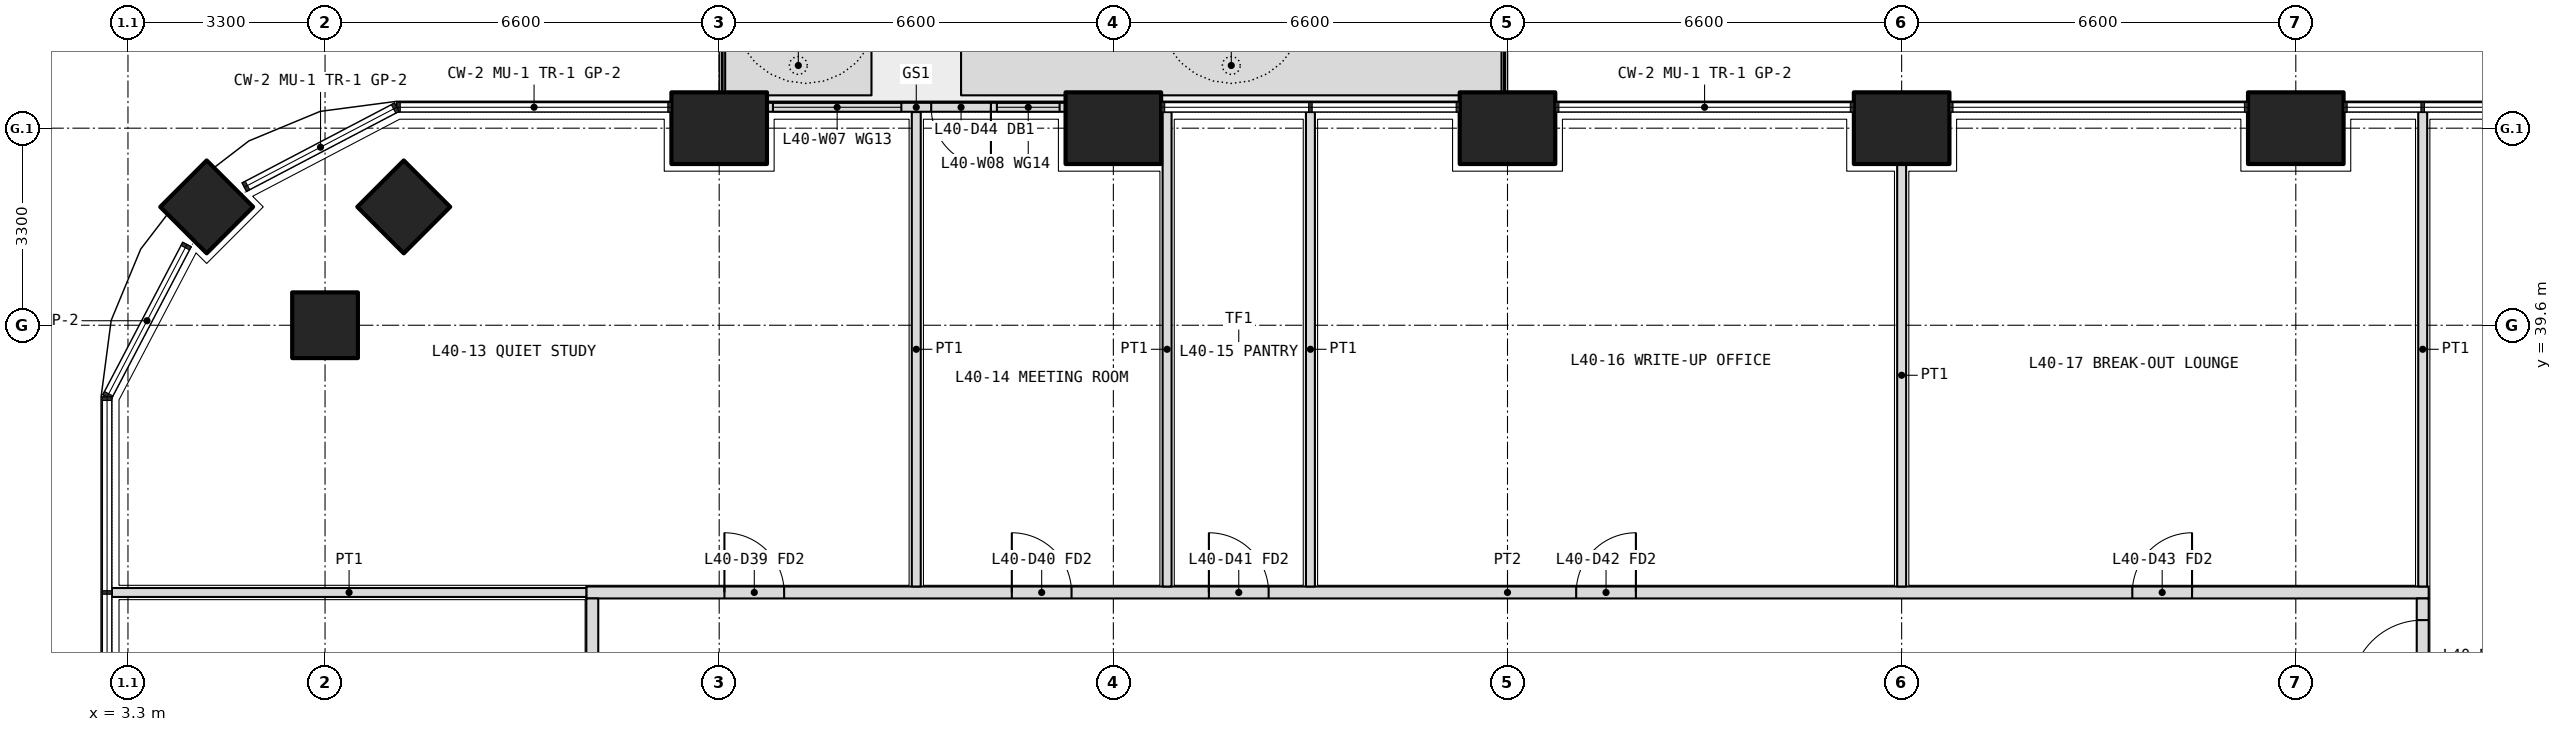
"""IFC4 building model, lengths in metres.
Left out: names, types, materials, properties, quantities, classifications, styles, units other than length and angle.
Written with IfcOpenShell. Run it as: python <this file> out.ifc"""

import sys

from ifc_helpers import new_model, si_unit, direction, frame, frame_2d, origin, origin_2d, place, context, subcontext, project, spatial, polyline, rectangle, outline, extrude, element, fill, save


model = new_model("IFC4")
c1 = context("Model", 3, precision=1e-05, world=origin(), true_north=direction((0.0, 1.0)))
c2 = subcontext(c1, "Body", "Model", "MODEL_VIEW")
j1 = project(units=[si_unit("LENGTHUNIT", "METRE"), si_unit("PLANEANGLEUNIT", "RADIAN")], contexts=[c1])
p1 = place(None, origin())
s1 = spatial("IfcSite", under=j1, at=p1, CompositionType="ELEMENT")
p2 = place(p1, origin())
s2 = spatial("IfcBuilding", under=s1, at=p2, CompositionType="ELEMENT")
p3 = place(p2, frame((0.0, 0.0, 176.7)))
s3 = spatial("IfcBuildingStorey", under=s2, at=p3, CompositionType="ELEMENT", Elevation=176.7)
p4 = place(p3, frame((4.618, 41.582, 0.0), z_axis=(0.0, 0.0, 1.0), x_axis=(0.707106781187, 0.707106781187, 0.0)))
e1 = element("IfcColumn", 1, at=p4, inside=s3, PredefinedType="COLUMN", context=c2, shape_type="SweptSolid", body=[
    extrude(rectangle(XDim=1.1, YDim=1.1, at=origin_2d()), origin(), (0.0, 0.0, 1.0), 4.2),
])
for number, where, z_axis, x_axis in (
    (2, (13.2, 42.9, 0.0), (0.0, 0.0, 1.0), (1.0, 0.0, 0.0)),
    (3, (19.8, 42.9, 0.0), (0.0, 0.0, 1.0), (1.0, 0.0, 0.0)),
    (4, (26.4, 42.9, 0.0), (0.0, 0.0, 1.0), (1.0, 0.0, 0.0)),
    (5, (33.0, 42.9, 0.0), (0.0, 0.0, 1.0), (1.0, 0.0, 0.0)),
    (6, (39.6, 42.9, 0.0), (0.0, 0.0, 1.0), (1.0, 0.0, 0.0)),
):
    element("IfcColumn", number, at=place(p3, frame(where, z_axis=z_axis, x_axis=x_axis)), inside=s3, PredefinedType="COLUMN", context=c2, shape_type="SweptSolid", body=[
        extrude(rectangle(XDim=1.6, YDim=1.2, at=origin_2d()), origin(), (0.0, 0.0, 1.0), 4.2),
    ])
for number, where, z_axis, x_axis in (
    (7, (6.6, 39.6, 0.0), (0.0, 0.0, 1.0), (1.0, 0.0, 0.0)),
    (8, (7.918, 41.582, 0.0), (0.0, 0.0, 1.0), (0.707, 0.707, 0.0)),
):
    element("IfcColumn", number, at=place(p3, frame(where, z_axis=z_axis, x_axis=x_axis)), inside=s3, PredefinedType="COLUMN", context=c2, shape_type="SweptSolid", body=[
        extrude(rectangle(XDim=1.1, YDim=1.1, at=origin_2d()), origin(), (0.0, 0.0, 1.0), 4.2),
    ])
p5 = place(p3, origin())
e9 = element("IfcWall", 9, at=p5, inside=s3, PredefinedType="USERDEFINED", context=c2, shape_type="SweptSolid", body=[
    extrude(outline(polyline([(13.3, 43.45), (15.75, 43.45), (15.75, 44.45), (13.3, 44.45), (13.3, 43.45)]), holes=[polyline([(13.45, 43.6), (15.6, 43.6), (15.6, 44.3), (13.45, 44.3), (13.45, 43.6)])]), origin(), (0.0, 0.0, 1.0), 1.05),
])
p6 = place(p3, origin())
e10 = element("IfcWall", 10, at=p6, inside=s3, PredefinedType="USERDEFINED", context=c2, shape_type="SweptSolid", body=[
    extrude(outline(polyline([(17.25, 43.45), (26.3, 43.45), (26.3, 44.45), (17.25, 44.45), (17.25, 43.45)]), holes=[polyline([(17.4, 43.6), (26.15, 43.6), (26.15, 44.3), (17.4, 44.3), (17.4, 43.6)])]), origin(), (0.0, 0.0, 1.0), 1.05),
])
p7 = place(p3, frame((19.0, 43.25, 0.0), z_axis=(0.0, 0.0, 1.0), x_axis=(-1.0, 0.0, 0.0)))
e11 = element("IfcWall", 11, at=p7, inside=s3, PredefinedType="SOLIDWALL", context=c2, shape_type="SweptSolid", body=[
    extrude(rectangle(XDim=5.0, YDim=0.15, at=frame_2d((2.5, 0.0))), origin(), (0.0, 0.0, 1.0), 2.7),
])
p8 = place(p7, frame((1.25, 0.0, 0.0)))
e12 = element("IfcOpeningElement", 12, at=p8, cuts=e11, PredefinedType="OPENING", context=c2, shape_type="SweptSolid", body=[
    extrude(rectangle(XDim=1.0, YDim=2.4, at=frame_2d((0.5, 1.2))), frame((0.0, 0.085, 0.0), z_axis=(0.0, -1.0, 0.0), x_axis=(1.0, 0.0, 0.0)), (0.0, 0.0, 1.0), 0.17),
])
p9 = place(p7, frame((0.1, 0.0, 0.1)))
e13 = element("IfcOpeningElement", 13, at=p9, cuts=e11, PredefinedType="OPENING", context=c2, shape_type="SweptSolid", body=[
    extrude(rectangle(XDim=1.05, YDim=2.3, at=frame_2d((0.525, 1.15))), frame((0.0, 0.085, 0.0), z_axis=(0.0, -1.0, 0.0), x_axis=(1.0, 0.0, 0.0)), (0.0, 0.0, 1.0), 0.17),
])
p10 = place(p7, frame((2.75, 0.0, 0.1)))
e14 = element("IfcOpeningElement", 14, at=p10, cuts=e11, PredefinedType="OPENING", context=c2, shape_type="SweptSolid", body=[
    extrude(rectangle(XDim=2.15, YDim=2.3, at=frame_2d((1.075, 1.15))), frame((0.0, 0.085, 0.0), z_axis=(0.0, -1.0, 0.0), x_axis=(1.0, 0.0, 0.0)), (0.0, 0.0, 1.0), 0.17),
])
p11 = place(p3, frame((10.975, 35.125, 0.0), z_axis=(0.0, 0.0, 1.0), x_axis=(1.0, 0.0, 0.0)))
e15 = element("IfcWall", 15, at=p11, inside=s3, PredefinedType="PARTITIONING", context=c2, shape_type="SweptSolid", body=[
    extrude(rectangle(XDim=30.85, YDim=0.2, at=frame_2d((15.425, 0.0))), origin(), (0.0, 0.0, 1.0), 2.85),
])
p12 = place(p11, frame((2.312, 0.0, 0.0)))
e16 = element("IfcOpeningElement", 16, at=p12, cuts=e15, PredefinedType="OPENING", context=c2, shape_type="SweptSolid", body=[
    extrude(rectangle(XDim=1.0, YDim=2.1, at=frame_2d((0.5, 1.05))), frame((0.0, 0.11, 0.0), z_axis=(0.0, -1.0, 0.0), x_axis=(1.0, 0.0, 0.0)), (0.0, 0.0, 1.0), 0.22),
])
p13 = place(p11, frame((7.125, 0.0, 0.0)))
e17 = element("IfcOpeningElement", 17, at=p13, cuts=e15, PredefinedType="OPENING", context=c2, shape_type="SweptSolid", body=[
    extrude(rectangle(XDim=1.0, YDim=2.1, at=frame_2d((0.5, 1.05))), frame((0.0, 0.11, 0.0), z_axis=(0.0, -1.0, 0.0), x_axis=(1.0, 0.0, 0.0)), (0.0, 0.0, 1.0), 0.22),
])
p14 = place(p11, frame((10.425, 0.0, 0.0)))
e18 = element("IfcOpeningElement", 18, at=p14, cuts=e15, PredefinedType="OPENING", context=c2, shape_type="SweptSolid", body=[
    extrude(rectangle(XDim=1.0, YDim=2.1, at=frame_2d((0.5, 1.05))), frame((0.0, 0.11, 0.0), z_axis=(0.0, -1.0, 0.0), x_axis=(1.0, 0.0, 0.0)), (0.0, 0.0, 1.0), 0.22),
])
p15 = place(p11, frame((16.575, 0.0, 0.0)))
e19 = element("IfcOpeningElement", 19, at=p15, cuts=e15, PredefinedType="OPENING", context=c2, shape_type="SweptSolid", body=[
    extrude(rectangle(XDim=1.0, YDim=2.1, at=frame_2d((0.5, 1.05))), frame((0.0, 0.11, 0.0), z_axis=(0.0, -1.0, 0.0), x_axis=(1.0, 0.0, 0.0)), (0.0, 0.0, 1.0), 0.22),
])
p16 = place(p11, frame((25.887, 0.0, 0.0)))
e20 = element("IfcOpeningElement", 20, at=p16, cuts=e15, PredefinedType="OPENING", context=c2, shape_type="SweptSolid", body=[
    extrude(rectangle(XDim=1.0, YDim=2.1, at=frame_2d((0.5, 1.05))), frame((0.0, 0.11, 0.0), z_axis=(0.0, -1.0, 0.0), x_axis=(1.0, 0.0, 0.0)), (0.0, 0.0, 1.0), 0.22),
])
p17 = place(p3, frame((11.075, 11.175, 0.0), z_axis=(0.0, 0.0, 1.0), x_axis=(0.0, 1.0, 0.0)))
e21 = element("IfcWall", 21, at=p17, inside=s3, PredefinedType="PARTITIONING", context=c2, shape_type="SweptSolid", body=[
    extrude(rectangle(XDim=23.85, YDim=0.2, at=frame_2d((11.925, 0.0))), origin(), (0.0, 0.0, 1.0), 2.85),
])
p18 = place(p17, frame((0.462, 0.0, 0.0)))
e22 = element("IfcOpeningElement", 22, at=p18, cuts=e21, PredefinedType="OPENING", context=c2, shape_type="SweptSolid", body=[
    extrude(rectangle(XDim=1.0, YDim=2.1, at=frame_2d((0.5, 1.05))), frame((0.0, 0.11, 0.0), z_axis=(0.0, -1.0, 0.0), x_axis=(1.0, 0.0, 0.0)), (0.0, 0.0, 1.0), 0.22),
])
p19 = place(p17, frame((3.125, 0.0, 0.0)))
e23 = element("IfcOpeningElement", 23, at=p19, cuts=e21, PredefinedType="OPENING", context=c2, shape_type="SweptSolid", body=[
    extrude(rectangle(XDim=1.0, YDim=2.1, at=frame_2d((0.5, 1.05))), frame((0.0, 0.11, 0.0), z_axis=(0.0, -1.0, 0.0), x_axis=(1.0, 0.0, 0.0)), (0.0, 0.0, 1.0), 0.22),
])
p20 = place(p17, frame((6.475, 0.0, 0.0)))
e24 = element("IfcOpeningElement", 24, at=p20, cuts=e21, PredefinedType="OPENING", context=c2, shape_type="SweptSolid", body=[
    extrude(rectangle(XDim=0.9, YDim=2.1, at=frame_2d((0.45, 1.05))), frame((0.0, 0.11, 0.0), z_axis=(0.0, -1.0, 0.0), x_axis=(1.0, 0.0, 0.0)), (0.0, 0.0, 1.0), 0.22),
])
p21 = place(p17, frame((9.675, 0.0, 0.0)))
e25 = element("IfcOpeningElement", 25, at=p21, cuts=e21, PredefinedType="OPENING", context=c2, shape_type="SweptSolid", body=[
    extrude(rectangle(XDim=0.9, YDim=2.1, at=frame_2d((0.45, 1.05))), frame((0.0, 0.11, 0.0), z_axis=(0.0, -1.0, 0.0), x_axis=(1.0, 0.0, 0.0)), (0.0, 0.0, 1.0), 0.22),
])
p22 = place(p17, frame((12.925, 0.0, 0.0)))
e26 = element("IfcOpeningElement", 26, at=p22, cuts=e21, PredefinedType="OPENING", context=c2, shape_type="SweptSolid", body=[
    extrude(rectangle(XDim=1.0, YDim=2.1, at=frame_2d((0.5, 1.05))), frame((0.0, 0.11, 0.0), z_axis=(0.0, -1.0, 0.0), x_axis=(1.0, 0.0, 0.0)), (0.0, 0.0, 1.0), 0.22),
])
p23 = place(p17, frame((19.087, 0.0, 0.0)))
e27 = element("IfcOpeningElement", 27, at=p23, cuts=e21, PredefinedType="OPENING", context=c2, shape_type="SweptSolid", body=[
    extrude(rectangle(XDim=1.0, YDim=2.1, at=frame_2d((0.5, 1.05))), frame((0.0, 0.11, 0.0), z_axis=(0.0, -1.0, 0.0), x_axis=(1.0, 0.0, 0.0)), (0.0, 0.0, 1.0), 0.22),
])
p24 = place(p3, frame((41.725, 11.175, 0.0), z_axis=(0.0, 0.0, 1.0), x_axis=(0.0, 1.0, 0.0)))
e28 = element("IfcWall", 28, at=p24, inside=s3, PredefinedType="PARTITIONING", context=c2, shape_type="SweptSolid", body=[
    extrude(rectangle(XDim=23.85, YDim=0.2, at=frame_2d((11.925, 0.0))), origin(), (0.0, 0.0, 1.0), 2.85),
])
p25 = place(p24, frame((2.113, 0.0, 0.0)))
e29 = element("IfcOpeningElement", 29, at=p25, cuts=e28, PredefinedType="OPENING", context=c2, shape_type="SweptSolid", body=[
    extrude(rectangle(XDim=1.0, YDim=2.1, at=frame_2d((0.5, 1.05))), frame((0.0, 0.11, 0.0), z_axis=(0.0, -1.0, 0.0), x_axis=(1.0, 0.0, 0.0)), (0.0, 0.0, 1.0), 0.22),
])
p26 = place(p24, frame((6.475, 0.0, 0.0)))
e30 = element("IfcOpeningElement", 30, at=p26, cuts=e28, PredefinedType="OPENING", context=c2, shape_type="SweptSolid", body=[
    extrude(rectangle(XDim=1.0, YDim=2.1, at=frame_2d((0.5, 1.05))), frame((0.0, 0.11, 0.0), z_axis=(0.0, -1.0, 0.0), x_axis=(1.0, 0.0, 0.0)), (0.0, 0.0, 1.0), 0.22),
])
p27 = place(p24, frame((9.625, 0.0, 0.0)))
e31 = element("IfcOpeningElement", 31, at=p27, cuts=e28, PredefinedType="OPENING", context=c2, shape_type="SweptSolid", body=[
    extrude(rectangle(XDim=1.0, YDim=2.1, at=frame_2d((0.5, 1.05))), frame((0.0, 0.11, 0.0), z_axis=(0.0, -1.0, 0.0), x_axis=(1.0, 0.0, 0.0)), (0.0, 0.0, 1.0), 0.22),
])
p28 = place(p24, frame((12.975, 0.0, 0.0)))
e32 = element("IfcOpeningElement", 32, at=p28, cuts=e28, PredefinedType="OPENING", context=c2, shape_type="SweptSolid", body=[
    extrude(rectangle(XDim=0.9, YDim=2.1, at=frame_2d((0.45, 1.05))), frame((0.0, 0.11, 0.0), z_axis=(0.0, -1.0, 0.0), x_axis=(1.0, 0.0, 0.0)), (0.0, 0.0, 1.0), 0.22),
])
p29 = place(p24, frame((16.375, 0.0, 0.0)))
e33 = element("IfcOpeningElement", 33, at=p29, cuts=e28, PredefinedType="OPENING", context=c2, shape_type="SweptSolid", body=[
    extrude(rectangle(XDim=1.0, YDim=2.1, at=frame_2d((0.5, 1.05))), frame((0.0, 0.11, 0.0), z_axis=(0.0, -1.0, 0.0), x_axis=(1.0, 0.0, 0.0)), (0.0, 0.0, 1.0), 0.22),
])
p30 = place(p24, frame((19.575, 0.0, 0.0)))
e34 = element("IfcOpeningElement", 34, at=p30, cuts=e28, PredefinedType="OPENING", context=c2, shape_type="SweptSolid", body=[
    extrude(rectangle(XDim=1.2, YDim=2.1, at=frame_2d((0.6, 1.05))), frame((0.0, 0.11, 0.0), z_axis=(0.0, -1.0, 0.0), x_axis=(1.0, 0.0, 0.0)), (0.0, 0.0, 1.0), 0.22),
])
p31 = place(p24, frame((22.288, 0.0, 0.0)))
e35 = element("IfcOpeningElement", 35, at=p31, cuts=e28, PredefinedType="OPENING", context=c2, shape_type="SweptSolid", body=[
    extrude(rectangle(XDim=1.2, YDim=2.1, at=frame_2d((0.6, 1.05))), frame((0.0, 0.11, 0.0), z_axis=(0.0, -1.0, 0.0), x_axis=(1.0, 0.0, 0.0)), (0.0, 0.0, 1.0), 0.22),
])
p32 = place(p3, frame((41.725, 43.17, 0.0), z_axis=(0.0, 0.0, 1.0), x_axis=(0.0, -1.0, 0.0)))
e36 = element("IfcWall", 36, at=p32, inside=s3, PredefinedType="PARTITIONING", context=c2, shape_type="SweptSolid", body=[
    extrude(rectangle(XDim=7.945, YDim=0.15, at=frame_2d((3.972, 0.0))), origin(), (0.0, 0.0, 1.0), 2.7),
])
p33 = place(p3, frame((3.03, 35.125, 0.0), z_axis=(0.0, 0.0, 1.0), x_axis=(1.0, 0.0, 0.0)))
e37 = element("IfcWall", 37, at=p33, inside=s3, PredefinedType="PARTITIONING", context=c2, shape_type="SweptSolid", body=[
    extrude(rectangle(XDim=7.945, YDim=0.15, at=frame_2d((3.973, 0.0))), origin(), (0.0, 0.0, 1.0), 2.7),
])
for number, where, z_axis, x_axis in (
    (38, (20.7, 43.17, 0.0), (0.0, 0.0, 1.0), (0.0, -1.0, 0.0)),
    (39, (23.1, 43.17, 0.0), (0.0, 0.0, 1.0), (0.0, -1.0, 0.0)),
    (40, (16.5, 43.17, 0.0), (0.0, 0.0, 1.0), (0.0, -1.0, 0.0)),
):
    element("IfcWall", number, at=place(p3, frame(where, z_axis=z_axis, x_axis=x_axis)), inside=s3, PredefinedType="PARTITIONING", context=c2, shape_type="SweptSolid", body=[
        extrude(rectangle(XDim=7.945, YDim=0.15, at=frame_2d((3.972, 0.0))), origin(), (0.0, 0.0, 1.0), 2.7),
    ])
p34 = place(p3, frame((33.0, 42.3, 0.0), z_axis=(0.0, 0.0, 1.0), x_axis=(0.0, -1.0, 0.0)))
e41 = element("IfcWall", 41, at=p34, inside=s3, PredefinedType="PARTITIONING", context=c2, shape_type="SweptSolid", body=[
    extrude(rectangle(XDim=7.075, YDim=0.15, at=frame_2d((3.538, 0.0))), origin(), (0.0, 0.0, 1.0), 2.85),
])
p35 = place(p8, origin())
e42 = element("IfcDoor", 42, at=p35, inside=s3, OperationType="SINGLE_SWING_LEFT", PredefinedType="DOOR", context=c2, shape_type="SweptSolid", body=[
    extrude(rectangle(XDim=1.0, YDim=2.4, at=frame_2d((0.5, 1.2))), frame((0.0, 0.025, 0.0), z_axis=(0.0, -1.0, 0.0), x_axis=(1.0, 0.0, 0.0)), (0.0, 0.0, 1.0), 0.05),
])
fill(e12, e42)
p36 = place(p9, origin())
e43 = element("IfcWindow", 43, at=p36, inside=s3, PartitioningType="SINGLE_PANEL", PredefinedType="WINDOW", context=c2, shape_type="SweptSolid", body=[
    extrude(rectangle(XDim=1.05, YDim=2.3, at=frame_2d((0.525, 1.15))), frame((0.0, 0.03, 0.0), z_axis=(0.0, -1.0, 0.0), x_axis=(1.0, 0.0, 0.0)), (0.0, 0.0, 1.0), 0.06),
])
fill(e13, e43)
p37 = place(p10, origin())
e44 = element("IfcWindow", 44, at=p37, inside=s3, PartitioningType="SINGLE_PANEL", PredefinedType="WINDOW", context=c2, shape_type="SweptSolid", body=[
    extrude(rectangle(XDim=2.15, YDim=2.3, at=frame_2d((1.075, 1.15))), frame((0.0, 0.03, 0.0), z_axis=(0.0, -1.0, 0.0), x_axis=(1.0, 0.0, 0.0)), (0.0, 0.0, 1.0), 0.06),
])
fill(e14, e44)
p38 = place(p31, origin())
e45 = element("IfcDoor", 45, at=p38, inside=s3, OperationType="DOUBLE_DOOR_SINGLE_SWING", PredefinedType="DOOR", context=c2, shape_type="SweptSolid", body=[
    extrude(rectangle(XDim=1.2, YDim=2.1, at=frame_2d((0.6, 1.05))), frame((0.0, 0.025, 0.0), z_axis=(0.0, -1.0, 0.0), x_axis=(1.0, 0.0, 0.0)), (0.0, 0.0, 1.0), 0.05),
])
fill(e35, e45)
p39 = place(p12, origin())
e46 = element("IfcDoor", 46, at=p39, inside=s3, OperationType="SINGLE_SWING_LEFT", PredefinedType="DOOR", context=c2, shape_type="SweptSolid", body=[
    extrude(rectangle(XDim=1.0, YDim=2.1, at=frame_2d((0.5, 1.05))), frame((0.0, 0.025, 0.0), z_axis=(0.0, -1.0, 0.0), x_axis=(1.0, 0.0, 0.0)), (0.0, 0.0, 1.0), 0.05),
])
fill(e16, e46)
p40 = place(p13, origin())
e47 = element("IfcDoor", 47, at=p40, inside=s3, OperationType="SINGLE_SWING_LEFT", PredefinedType="DOOR", context=c2, shape_type="SweptSolid", body=[
    extrude(rectangle(XDim=1.0, YDim=2.1, at=frame_2d((0.5, 1.05))), frame((0.0, 0.025, 0.0), z_axis=(0.0, -1.0, 0.0), x_axis=(1.0, 0.0, 0.0)), (0.0, 0.0, 1.0), 0.05),
])
fill(e17, e47)
p41 = place(p14, origin())
e48 = element("IfcDoor", 48, at=p41, inside=s3, OperationType="SINGLE_SWING_LEFT", PredefinedType="DOOR", context=c2, shape_type="SweptSolid", body=[
    extrude(rectangle(XDim=1.0, YDim=2.1, at=frame_2d((0.5, 1.05))), frame((0.0, 0.025, 0.0), z_axis=(0.0, -1.0, 0.0), x_axis=(1.0, 0.0, 0.0)), (0.0, 0.0, 1.0), 0.05),
])
fill(e18, e48)
p42 = place(p15, origin())
e49 = element("IfcDoor", 49, at=p42, inside=s3, OperationType="SINGLE_SWING_RIGHT", PredefinedType="DOOR", context=c2, shape_type="SweptSolid", body=[
    extrude(rectangle(XDim=1.0, YDim=2.1, at=frame_2d((0.5, 1.05))), frame((0.0, 0.025, 0.0), z_axis=(0.0, -1.0, 0.0), x_axis=(1.0, 0.0, 0.0)), (0.0, 0.0, 1.0), 0.05),
])
fill(e19, e49)
p43 = place(p16, origin())
e50 = element("IfcDoor", 50, at=p43, inside=s3, OperationType="SINGLE_SWING_RIGHT", PredefinedType="DOOR", context=c2, shape_type="SweptSolid", body=[
    extrude(rectangle(XDim=1.0, YDim=2.1, at=frame_2d((0.5, 1.05))), frame((0.0, 0.025, 0.0), z_axis=(0.0, -1.0, 0.0), x_axis=(1.0, 0.0, 0.0)), (0.0, 0.0, 1.0), 0.05),
])
fill(e20, e50)
save(model, sys.argv[1])
